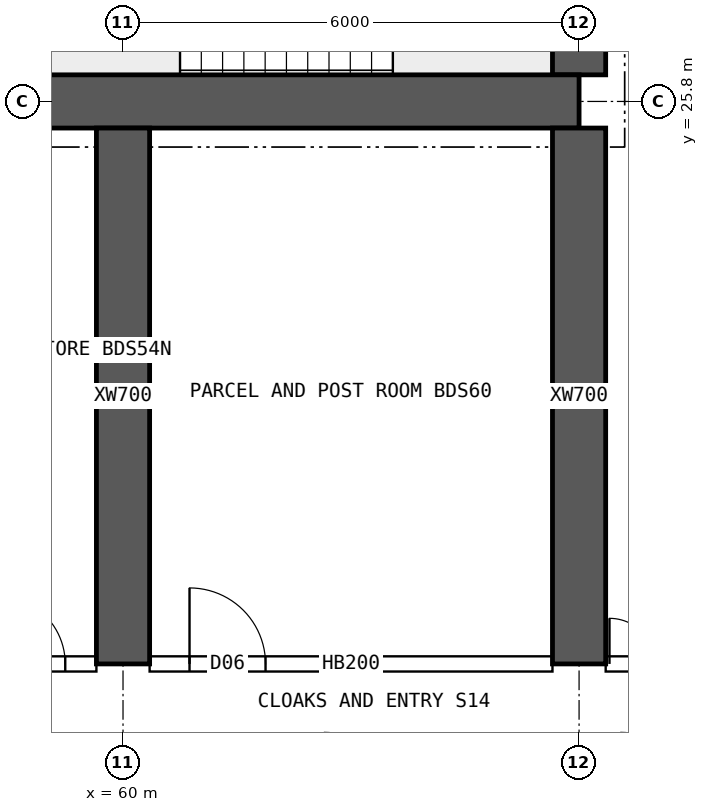
"""IFC4 building model, lengths in metres.
Left out: names, types, materials, properties, quantities, classifications, styles, units other than length and angle.
Written with IfcOpenShell. Run it as: python <this file> out.ifc"""

import sys

from ifc_helpers import new_model, si_unit, direction, frame, frame_2d, origin, place, context, subcontext, project, spatial, rectangle, extrude, element, fill, save


model = new_model("IFC4")
c1 = context("Model", 3, precision=1e-05, world=origin(), true_north=direction((0.0, 1.0)))
c2 = subcontext(c1, "Body", "Model", "MODEL_VIEW")
j1 = project(units=[si_unit("LENGTHUNIT", "METRE"), si_unit("PLANEANGLEUNIT", "RADIAN")], contexts=[c1])
p1 = place(None, origin())
s1 = spatial("IfcSite", under=j1, at=p1, CompositionType="ELEMENT")
p2 = place(p1, origin())
s2 = spatial("IfcBuilding", under=s1, at=p2, CompositionType="ELEMENT")
p3 = place(p2, frame((0.0, 0.0, 254.05)))
s3 = spatial("IfcBuildingStorey", under=s2, at=p3, CompositionType="ELEMENT", Elevation=254.05)
p4 = place(p3, frame((18.0, 25.8, 0.0), z_axis=(0.0, 0.0, 1.0), x_axis=(1.0, 0.0, 0.0)))
e1 = element("IfcWall", 1, at=p4, inside=s3, PredefinedType="SHEAR", context=c2, shape_type="SweptSolid", body=[
    extrude(rectangle(XDim=48.0, YDim=0.7, at=frame_2d((24.0, 0.0))), origin(), (0.0, 0.0, 1.0), 3.75),
])
p5 = place(p3, frame((66.0, 26.15, 0.0), z_axis=(0.0, 0.0, 1.0), x_axis=(0.0, 1.0, 0.0)))
e2 = element("IfcWall", 2, at=p5, inside=s3, PredefinedType="SHEAR", context=c2, shape_type="SweptSolid", body=[
    extrude(rectangle(XDim=11.7, YDim=0.7, at=frame_2d((5.85, 0.0))), origin(), (0.0, 0.0, 1.0), 3.75),
])
p6 = place(p5, frame((5.15, 0.0, 0.0)))
e3 = element("IfcOpeningElement", 3, at=p6, cuts=e2, PredefinedType="OPENING", context=c2, shape_type="SweptSolid", body=[
    extrude(rectangle(XDim=1.2, YDim=2.1, at=frame_2d((0.6, 1.05))), frame((0.0, 0.36, 0.0), z_axis=(0.0, -1.0, 0.0), x_axis=(1.0, 0.0, 0.0)), (0.0, 0.0, 1.0), 0.72),
])
for number, where, z_axis, x_axis in (
    (4, (60.0, 18.4, 0.0), (0.0, 0.0, 1.0), (0.0, 1.0, 0.0)),
    (5, (66.0, 18.4, 0.0), (0.0, 0.0, 1.0), (0.0, 1.0, 0.0)),
):
    element("IfcWall", number, at=place(p3, frame(where, z_axis=z_axis, x_axis=x_axis)), inside=s3, PredefinedType="SHEAR", context=c2, shape_type="SweptSolid", body=[
        extrude(rectangle(XDim=7.05, YDim=0.7, at=frame_2d((3.525, 0.0))), origin(), (0.0, 0.0, 1.0), 3.75),
    ])
p7 = place(p3, frame((54.35, 18.4, 0.0), z_axis=(0.0, 0.0, 1.0), x_axis=(1.0, 0.0, 0.0)))
e6 = element("IfcWall", 6, at=p7, inside=s3, PredefinedType="SOLIDWALL", context=c2, shape_type="SweptSolid", body=[
    extrude(rectangle(XDim=5.3, YDim=0.2, at=frame_2d((2.65, 0.0))), origin(), (0.0, 0.0, 1.0), 3.45),
])
p8 = place(p7, frame((0.35, 0.0, 0.0)))
e7 = element("IfcOpeningElement", 7, at=p8, cuts=e6, PredefinedType="OPENING", context=c2, shape_type="SweptSolid", body=[
    extrude(rectangle(XDim=0.9, YDim=2.1, at=frame_2d((0.45, 1.05))), frame((0.0, 0.11, 0.0), z_axis=(0.0, -1.0, 0.0), x_axis=(1.0, 0.0, 0.0)), (0.0, 0.0, 1.0), 0.22),
])
p9 = place(p7, frame((3.99, 0.0, 0.0)))
e8 = element("IfcOpeningElement", 8, at=p9, cuts=e6, PredefinedType="OPENING", context=c2, shape_type="SweptSolid", body=[
    extrude(rectangle(XDim=0.9, YDim=2.1, at=frame_2d((0.45, 1.05))), frame((0.0, 0.11, 0.0), z_axis=(0.0, -1.0, 0.0), x_axis=(1.0, 0.0, 0.0)), (0.0, 0.0, 1.0), 0.22),
])
p10 = place(p3, frame((60.35, 18.4, 0.0), z_axis=(0.0, 0.0, 1.0), x_axis=(1.0, 0.0, 0.0)))
e9 = element("IfcWall", 9, at=p10, inside=s3, PredefinedType="SOLIDWALL", context=c2, shape_type="SweptSolid", body=[
    extrude(rectangle(XDim=5.3, YDim=0.2, at=frame_2d((2.65, 0.0))), origin(), (0.0, 0.0, 1.0), 3.45),
])
p11 = place(p10, frame((0.525, 0.0, 0.0)))
e10 = element("IfcOpeningElement", 10, at=p11, cuts=e9, PredefinedType="OPENING", context=c2, shape_type="SweptSolid", body=[
    extrude(rectangle(XDim=1.0, YDim=2.1, at=frame_2d((0.5, 1.05))), frame((0.0, 0.11, 0.0), z_axis=(0.0, -1.0, 0.0), x_axis=(1.0, 0.0, 0.0)), (0.0, 0.0, 1.0), 0.22),
])
p12 = place(p3, frame((66.35, 18.4, 0.0), z_axis=(0.0, 0.0, 1.0), x_axis=(1.0, 0.0, 0.0)))
e11 = element("IfcWall", 11, at=p12, inside=s3, PredefinedType="SOLIDWALL", context=c2, shape_type="SweptSolid", body=[
    extrude(rectangle(XDim=2.05, YDim=0.2, at=frame_2d((1.025, 0.0))), origin(), (0.0, 0.0, 1.0), 3.45),
])
p13 = place(p12, frame((0.05, 0.0, 0.0)))
e12 = element("IfcOpeningElement", 12, at=p13, cuts=e11, PredefinedType="OPENING", context=c2, shape_type="SweptSolid", body=[
    extrude(rectangle(XDim=1.2, YDim=2.1, at=frame_2d((0.6, 1.05))), frame((0.0, 0.11, 0.0), z_axis=(0.0, -1.0, 0.0), x_axis=(1.0, 0.0, 0.0)), (0.0, 0.0, 1.0), 0.22),
])
p14 = place(p13, origin())
e13 = element("IfcDoor", 13, at=p14, inside=s3, OperationType="DOUBLE_DOOR_SINGLE_SWING", PredefinedType="DOOR", context=c2, shape_type="SweptSolid", body=[
    extrude(rectangle(XDim=1.2, YDim=2.1, at=frame_2d((0.6, 1.05))), frame((0.0, 0.025, 0.0), z_axis=(0.0, -1.0, 0.0), x_axis=(1.0, 0.0, 0.0)), (0.0, 0.0, 1.0), 0.05),
])
fill(e12, e13)
p15 = place(p9, origin())
e14 = element("IfcDoor", 14, at=p15, inside=s3, OperationType="SINGLE_SWING_LEFT", PredefinedType="DOOR", context=c2, shape_type="SweptSolid", body=[
    extrude(rectangle(XDim=0.9, YDim=2.1, at=frame_2d((0.45, 1.05))), frame((0.0, 0.025, 0.0), z_axis=(0.0, -1.0, 0.0), x_axis=(1.0, 0.0, 0.0)), (0.0, 0.0, 1.0), 0.05),
])
fill(e8, e14)
p16 = place(p11, origin())
e15 = element("IfcDoor", 15, at=p16, inside=s3, OperationType="SINGLE_SWING_LEFT", PredefinedType="DOOR", context=c2, shape_type="SweptSolid", body=[
    extrude(rectangle(XDim=1.0, YDim=2.1, at=frame_2d((0.5, 1.05))), frame((0.0, 0.025, 0.0), z_axis=(0.0, -1.0, 0.0), x_axis=(1.0, 0.0, 0.0)), (0.0, 0.0, 1.0), 0.05),
])
fill(e10, e15)
save(model, sys.argv[1])
